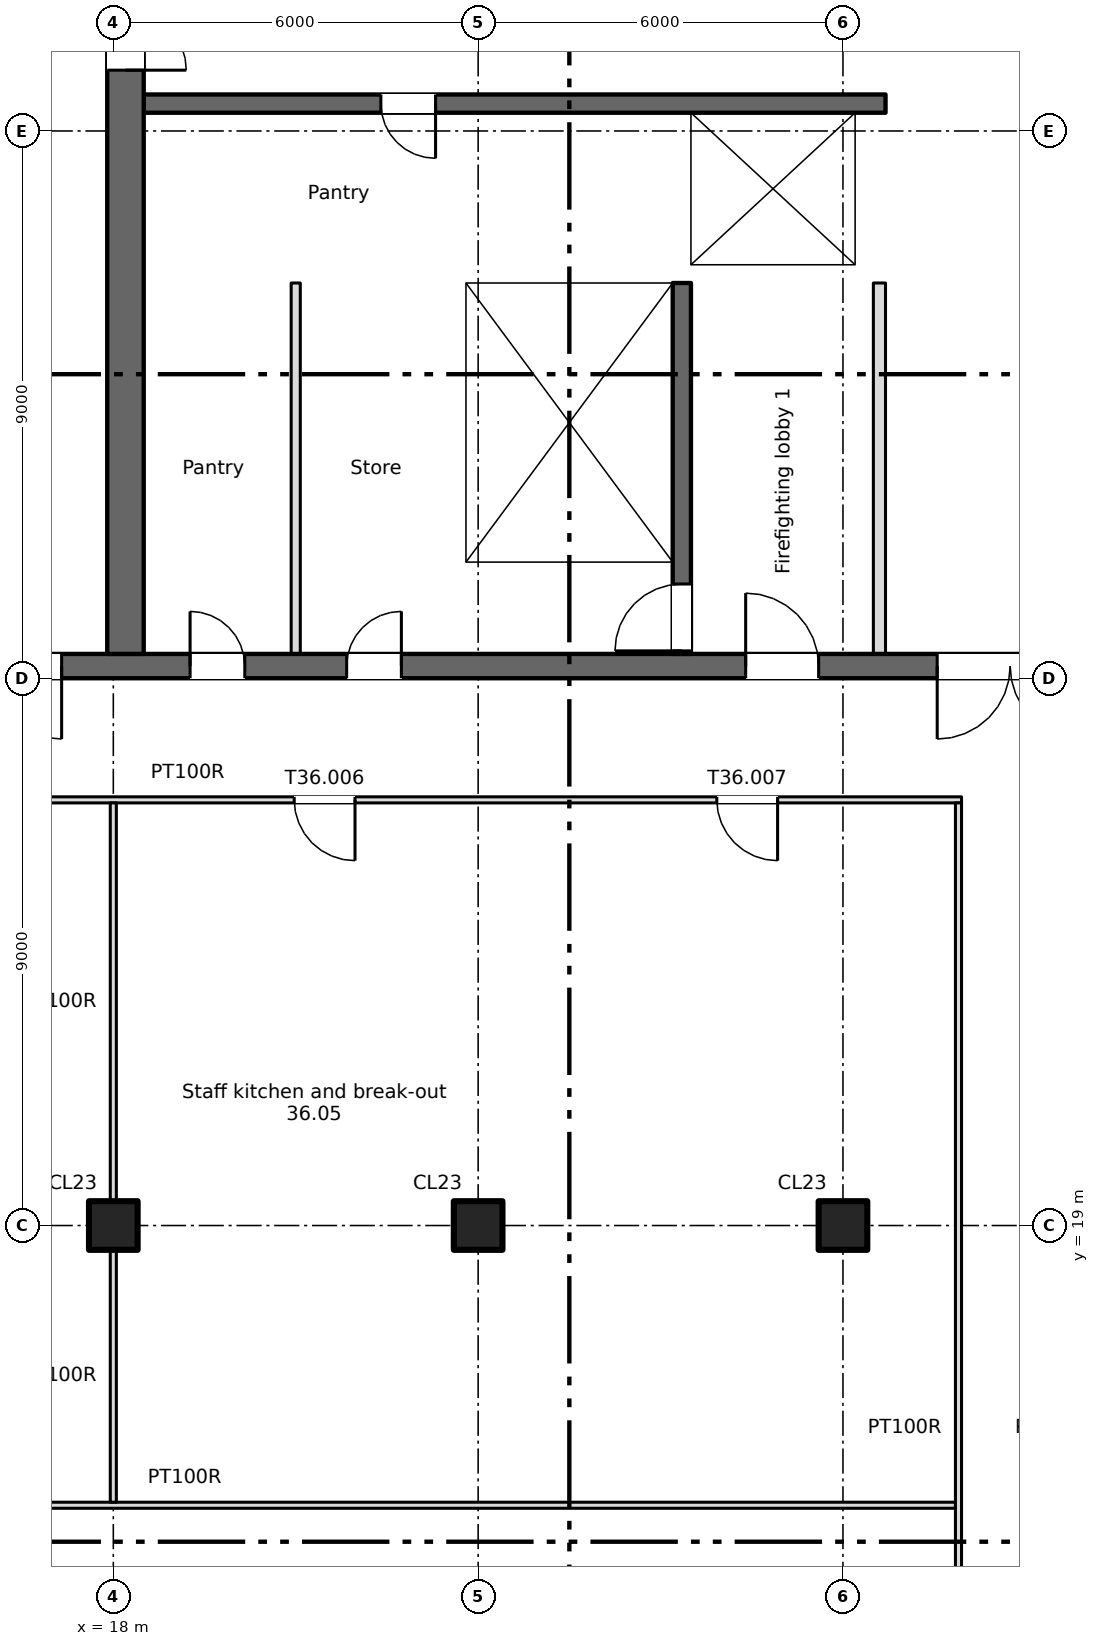
"""IFC4 building model, lengths in metres.
Left out: names, types, materials, properties, quantities, classifications, styles, units other than length and angle.
Written with IfcOpenShell. Run it as: python <this file> out.ifc"""

import sys

from ifc_helpers import new_model, si_unit, direction, frame, frame_2d, origin, origin_2d, place, context, subcontext, project, spatial, rectangle, extrude, element, fill, save


model = new_model("IFC4")
c1 = context("Model", 3, precision=1e-05, world=origin(), true_north=direction((0.0, 1.0)))
c2 = subcontext(c1, "Body", "Model", "MODEL_VIEW")
j1 = project(units=[si_unit("LENGTHUNIT", "METRE"), si_unit("PLANEANGLEUNIT", "RADIAN")], contexts=[c1])
p1 = place(None, origin())
s1 = spatial("IfcSite", under=j1, at=p1, CompositionType="ELEMENT")
p2 = place(p1, origin())
s2 = spatial("IfcBuilding", under=s1, at=p2, CompositionType="ELEMENT")
p3 = place(p2, frame((0.0, 0.0, 254.55)))
s3 = spatial("IfcBuildingStorey", under=s2, at=p3, CompositionType="ELEMENT", Elevation=254.55)
for number, where, z_axis, x_axis in (
    (1, (18.0, 19.0, 0.0), (0.0, 0.0, 1.0), (1.0, 0.0, 0.0)),
    (2, (24.0, 19.0, 0.0), (0.0, 0.0, 1.0), (1.0, 0.0, 0.0)),
    (3, (30.0, 19.0, 0.0), (0.0, 0.0, 1.0), (1.0, 0.0, 0.0)),
):
    element("IfcColumn", number, at=place(p3, frame(where, z_axis=z_axis, x_axis=x_axis)), inside=s3, PredefinedType="COLUMN", context=c2, shape_type="SweptSolid", body=[
        extrude(rectangle(XDim=0.8, YDim=0.8, at=origin_2d()), origin(), (0.0, 0.0, 1.0), 3.4),
    ])
p4 = place(p3, frame((6.5, 28.2, 0.0), z_axis=(0.0, 0.0, 1.0), x_axis=(1.0, 0.0, 0.0)))
e4 = element("IfcWall", 4, at=p4, inside=s3, PredefinedType="SHEAR", context=c2, shape_type="SweptSolid", body=[
    extrude(rectangle(XDim=58.0, YDim=0.4, at=frame_2d((29.0, 0.0))), origin(), (0.0, 0.0, 1.0), 3.4),
])
p5 = place(p4, frame((12.762, 0.0, 0.0)))
e5 = element("IfcOpeningElement", 5, at=p5, cuts=e4, PredefinedType="OPENING", context=c2, shape_type="SweptSolid", body=[
    extrude(rectangle(XDim=0.9, YDim=2.1, at=frame_2d((0.45, 1.05))), frame((0.0, 0.21, 0.0), z_axis=(0.0, -1.0, 0.0), x_axis=(1.0, 0.0, 0.0)), (0.0, 0.0, 1.0), 0.42),
])
p6 = place(p4, frame((15.337, 0.0, 0.0)))
e6 = element("IfcOpeningElement", 6, at=p6, cuts=e4, PredefinedType="OPENING", context=c2, shape_type="SweptSolid", body=[
    extrude(rectangle(XDim=0.9, YDim=2.1, at=frame_2d((0.45, 1.05))), frame((0.0, 0.21, 0.0), z_axis=(0.0, -1.0, 0.0), x_axis=(1.0, 0.0, 0.0)), (0.0, 0.0, 1.0), 0.42),
])
p7 = place(p4, frame((50.05, 0.0, 0.0)))
e7 = element("IfcOpeningElement", 7, at=p7, cuts=e4, PredefinedType="OPENING", context=c2, shape_type="SweptSolid", body=[
    extrude(rectangle(XDim=0.9, YDim=2.1, at=frame_2d((0.45, 1.05))), frame((0.0, 0.21, 0.0), z_axis=(0.0, -1.0, 0.0), x_axis=(1.0, 0.0, 0.0)), (0.0, 0.0, 1.0), 0.42),
])
p8 = place(p4, frame((0.762, 0.0, 0.0)))
e8 = element("IfcOpeningElement", 8, at=p8, cuts=e4, PredefinedType="OPENING", context=c2, shape_type="SweptSolid", body=[
    extrude(rectangle(XDim=0.9, YDim=2.1, at=frame_2d((0.45, 1.05))), frame((0.0, 0.21, 0.0), z_axis=(0.0, -1.0, 0.0), x_axis=(1.0, 0.0, 0.0)), (0.0, 0.0, 1.0), 0.42),
])
p9 = place(p4, frame((2.337, 0.0, 0.0)))
e9 = element("IfcOpeningElement", 9, at=p9, cuts=e4, PredefinedType="OPENING", context=c2, shape_type="SweptSolid", body=[
    extrude(rectangle(XDim=0.9, YDim=2.1, at=frame_2d((0.45, 1.05))), frame((0.0, 0.21, 0.0), z_axis=(0.0, -1.0, 0.0), x_axis=(1.0, 0.0, 0.0)), (0.0, 0.0, 1.0), 0.42),
])
p10 = place(p4, frame((4.9, 0.0, 0.0)))
e10 = element("IfcOpeningElement", 10, at=p10, cuts=e4, PredefinedType="OPENING", context=c2, shape_type="SweptSolid", body=[
    extrude(rectangle(XDim=1.2, YDim=2.1, at=frame_2d((0.6, 1.05))), frame((0.0, 0.21, 0.0), z_axis=(0.0, -1.0, 0.0), x_axis=(1.0, 0.0, 0.0)), (0.0, 0.0, 1.0), 0.42),
])
p11 = place(p4, frame((31.9, 0.0, 0.0)))
e11 = element("IfcOpeningElement", 11, at=p11, cuts=e4, PredefinedType="OPENING", context=c2, shape_type="SweptSolid", body=[
    extrude(rectangle(XDim=1.2, YDim=2.1, at=frame_2d((0.6, 1.05))), frame((0.0, 0.21, 0.0), z_axis=(0.0, -1.0, 0.0), x_axis=(1.0, 0.0, 0.0)), (0.0, 0.0, 1.0), 0.42),
])
p12 = place(p4, frame((55.4, 0.0, 0.0)))
e12 = element("IfcOpeningElement", 12, at=p12, cuts=e4, PredefinedType="OPENING", context=c2, shape_type="SweptSolid", body=[
    extrude(rectangle(XDim=1.2, YDim=2.1, at=frame_2d((0.6, 1.05))), frame((0.0, 0.21, 0.0), z_axis=(0.0, -1.0, 0.0), x_axis=(1.0, 0.0, 0.0)), (0.0, 0.0, 1.0), 0.42),
])
p13 = place(p4, frame((21.9, 0.0, 0.0)))
e13 = element("IfcOpeningElement", 13, at=p13, cuts=e4, PredefinedType="OPENING", context=c2, shape_type="SweptSolid", body=[
    extrude(rectangle(XDim=1.2, YDim=2.1, at=frame_2d((0.6, 1.05))), frame((0.0, 0.21, 0.0), z_axis=(0.0, -1.0, 0.0), x_axis=(1.0, 0.0, 0.0)), (0.0, 0.0, 1.0), 0.42),
])
p14 = place(p4, frame((41.9, 0.0, 0.0)))
e14 = element("IfcOpeningElement", 14, at=p14, cuts=e4, PredefinedType="OPENING", context=c2, shape_type="SweptSolid", body=[
    extrude(rectangle(XDim=1.2, YDim=2.1, at=frame_2d((0.6, 1.05))), frame((0.0, 0.21, 0.0), z_axis=(0.0, -1.0, 0.0), x_axis=(1.0, 0.0, 0.0)), (0.0, 0.0, 1.0), 0.42),
])
p15 = place(p4, frame((25.05, 0.0, 0.0)))
e15 = element("IfcOpeningElement", 15, at=p15, cuts=e4, PredefinedType="OPENING", context=c2, shape_type="SweptSolid", body=[
    extrude(rectangle(XDim=2.4, YDim=2.1, at=frame_2d((1.2, 1.05))), frame((0.0, 0.21, 0.0), z_axis=(0.0, -1.0, 0.0), x_axis=(1.0, 0.0, 0.0)), (0.0, 0.0, 1.0), 0.42),
])
p16 = place(p4, frame((37.55, 0.0, 0.0)))
e16 = element("IfcOpeningElement", 16, at=p16, cuts=e4, PredefinedType="OPENING", context=c2, shape_type="SweptSolid", body=[
    extrude(rectangle(XDim=2.4, YDim=2.1, at=frame_2d((1.2, 1.05))), frame((0.0, 0.21, 0.0), z_axis=(0.0, -1.0, 0.0), x_axis=(1.0, 0.0, 0.0)), (0.0, 0.0, 1.0), 0.42),
])
p17 = place(p4, frame((8.25, 0.0, 0.0)))
e17 = element("IfcOpeningElement", 17, at=p17, cuts=e4, PredefinedType="OPENING", context=c2, shape_type="SweptSolid", body=[
    extrude(rectangle(XDim=2.4, YDim=2.1, at=frame_2d((1.2, 1.05))), frame((0.0, 0.21, 0.0), z_axis=(0.0, -1.0, 0.0), x_axis=(1.0, 0.0, 0.0)), (0.0, 0.0, 1.0), 0.42),
])
p18 = place(p4, frame((29.05, 0.0, 0.0)))
e18 = element("IfcOpeningElement", 18, at=p18, cuts=e4, PredefinedType="OPENING", context=c2, shape_type="SweptSolid", body=[
    extrude(rectangle(XDim=0.9, YDim=2.1, at=frame_2d((0.45, 1.05))), frame((0.0, 0.21, 0.0), z_axis=(0.0, -1.0, 0.0), x_axis=(1.0, 0.0, 0.0)), (0.0, 0.0, 1.0), 0.42),
])
p19 = place(p4, frame((35.05, 0.0, 0.0)))
e19 = element("IfcOpeningElement", 19, at=p19, cuts=e4, PredefinedType="OPENING", context=c2, shape_type="SweptSolid", body=[
    extrude(rectangle(XDim=0.9, YDim=2.1, at=frame_2d((0.45, 1.05))), frame((0.0, 0.21, 0.0), z_axis=(0.0, -1.0, 0.0), x_axis=(1.0, 0.0, 0.0)), (0.0, 0.0, 1.0), 0.42),
])
p20 = place(p3, frame((18.2, 28.4, 0.0), z_axis=(0.0, 0.0, 1.0), x_axis=(0.0, 1.0, 0.0)))
e20 = element("IfcWall", 20, at=p20, inside=s3, PredefinedType="SHEAR", context=c2, shape_type="SweptSolid", body=[
    extrude(rectangle(XDim=17.0, YDim=0.6, at=frame_2d((8.5, 0.0))), origin(), (0.0, 0.0, 1.0), 3.4),
])
p21 = place(p20, frame((9.6, 0.0, 0.0)))
e21 = element("IfcOpeningElement", 21, at=p21, cuts=e20, PredefinedType="OPENING", context=c2, shape_type="SweptSolid", body=[
    extrude(rectangle(XDim=2.0, YDim=2.1, at=frame_2d((1.0, 1.05))), frame((0.0, 0.31, 0.0), z_axis=(0.0, -1.0, 0.0), x_axis=(1.0, 0.0, 0.0)), (0.0, 0.0, 1.0), 0.62),
])
p22 = place(p20, frame((15.45, 0.0, 0.0)))
e22 = element("IfcOpeningElement", 22, at=p22, cuts=e20, PredefinedType="OPENING", context=c2, shape_type="SweptSolid", body=[
    extrude(rectangle(XDim=1.2, YDim=2.1, at=frame_2d((0.6, 1.05))), frame((0.0, 0.31, 0.0), z_axis=(0.0, -1.0, 0.0), x_axis=(1.0, 0.0, 0.0)), (0.0, 0.0, 1.0), 0.62),
])
p23 = place(p3, frame((23.65, 28.4, 0.0), z_axis=(0.0, 0.0, 1.0), x_axis=(0.0, 1.0, 0.0)))
e23 = element("IfcWall", 23, at=p23, inside=s3, PredefinedType="SHEAR", context=c2, shape_type="SweptSolid", body=[
    extrude(rectangle(XDim=6.1, YDim=0.3, at=frame_2d((3.05, 0.0))), origin(), (0.0, 0.0, 1.0), 3.4),
])
p24 = place(p3, frame((27.35, 28.4, 0.0), z_axis=(0.0, 0.0, 1.0), x_axis=(0.0, 1.0, 0.0)))
e24 = element("IfcWall", 24, at=p24, inside=s3, PredefinedType="SHEAR", context=c2, shape_type="SweptSolid", body=[
    extrude(rectangle(XDim=6.1, YDim=0.3, at=frame_2d((3.05, 0.0))), origin(), (0.0, 0.0, 1.0), 3.4),
])
p25 = place(p24, frame((0.05, 0.0, 0.0)))
e25 = element("IfcOpeningElement", 25, at=p25, cuts=e24, PredefinedType="OPENING", context=c2, shape_type="SweptSolid", body=[
    extrude(rectangle(XDim=1.1, YDim=2.1, at=frame_2d((0.55, 1.05))), frame((0.0, 0.16, 0.0), z_axis=(0.0, -1.0, 0.0), x_axis=(1.0, 0.0, 0.0)), (0.0, 0.0, 1.0), 0.32),
])
p26 = place(p3, frame((18.5, 34.65, 0.0), z_axis=(0.0, 0.0, 1.0), x_axis=(1.0, 0.0, 0.0)))
e26 = element("IfcWall", 26, at=p26, inside=s3, PredefinedType="SHEAR", context=c2, shape_type="SweptSolid", body=[
    extrude(rectangle(XDim=12.2, YDim=0.3, at=frame_2d((6.1, 0.0))), origin(), (0.0, 0.0, 1.0), 3.4),
])
p27 = place(p26, frame((9.8, 0.0, 0.0)))
e27 = element("IfcOpeningElement", 27, at=p27, cuts=e26, PredefinedType="OPENING", context=c2, shape_type="SweptSolid", body=[
    extrude(rectangle(XDim=1.1, YDim=2.1, at=frame_2d((0.55, 1.05))), frame((0.0, 0.16, 0.0), z_axis=(0.0, -1.0, 0.0), x_axis=(1.0, 0.0, 0.0)), (0.0, 0.0, 1.0), 0.32),
])
p28 = place(p3, frame((30.7, 37.45, 0.0), z_axis=(0.0, 0.0, 1.0), x_axis=(-1.0, 0.0, 0.0)))
e28 = element("IfcWall", 28, at=p28, inside=s3, PredefinedType="SHEAR", context=c2, shape_type="SweptSolid", body=[
    extrude(rectangle(XDim=12.2, YDim=0.3, at=frame_2d((6.1, 0.0))), origin(), (0.0, 0.0, 1.0), 3.4),
])
p29 = place(p28, frame((7.4, 0.0, 0.0)))
e29 = element("IfcOpeningElement", 29, at=p29, cuts=e28, PredefinedType="OPENING", context=c2, shape_type="SweptSolid", body=[
    extrude(rectangle(XDim=0.9, YDim=2.1, at=frame_2d((0.45, 1.05))), frame((0.0, 0.16, 0.0), z_axis=(0.0, -1.0, 0.0), x_axis=(1.0, 0.0, 0.0)), (0.0, 0.0, 1.0), 0.32),
])
p30 = place(p3, frame((27.35, 34.8, 0.0), z_axis=(0.0, 0.0, 1.0), x_axis=(0.0, 1.0, 0.0)))
e30 = element("IfcWall", 30, at=p30, inside=s3, PredefinedType="SHEAR", context=c2, shape_type="SweptSolid", body=[
    extrude(rectangle(XDim=2.5, YDim=0.3, at=frame_2d((1.25, 0.0))), origin(), (0.0, 0.0, 1.0), 3.4),
])
p31 = place(p3, frame((30.45, 34.8, 0.0), z_axis=(0.0, 0.0, 1.0), x_axis=(0.0, 1.0, 0.0)))
e31 = element("IfcWall", 31, at=p31, inside=s3, PredefinedType="SHEAR", context=c2, shape_type="SweptSolid", body=[
    extrude(rectangle(XDim=2.5, YDim=0.5, at=frame_2d((1.25, 0.0))), origin(), (0.0, 0.0, 1.0), 3.4),
])
p32 = place(p3, frame((30.6, 28.4, 0.0), z_axis=(0.0, 0.0, 1.0), x_axis=(0.0, 1.0, 0.0)))
e32 = element("IfcWall", 32, at=p32, inside=s3, PredefinedType="PARTITIONING", context=c2, shape_type="SweptSolid", body=[
    extrude(rectangle(XDim=6.1, YDim=0.2, at=frame_2d((3.05, 0.0))), origin(), (0.0, 0.0, 1.0), 3.4),
])
p33 = place(p3, frame((21.0, 28.4, 0.0), z_axis=(0.0, 0.0, 1.0), x_axis=(0.0, 1.0, 0.0)))
e33 = element("IfcWall", 33, at=p33, inside=s3, PredefinedType="PARTITIONING", context=c2, shape_type="SweptSolid", body=[
    extrude(rectangle(XDim=6.1, YDim=0.15, at=frame_2d((3.05, 0.0))), origin(), (0.0, 0.0, 1.0), 3.4),
])
p34 = place(p3, frame((6.5, 14.4, 0.0), z_axis=(0.0, 0.0, 1.0), x_axis=(1.0, 0.0, 0.0)))
e34 = element("IfcWall", 34, at=p34, inside=s3, PredefinedType="PARTITIONING", context=c2, shape_type="SweptSolid", body=[
    extrude(rectangle(XDim=25.35, YDim=0.1, at=frame_2d((12.675, 0.0))), origin(), (0.0, 0.0, 1.0), 3.4),
])
p35 = place(p3, frame((6.5, 26.0, 0.0), z_axis=(0.0, 0.0, 1.0), x_axis=(1.0, 0.0, 0.0)))
e35 = element("IfcWall", 35, at=p35, inside=s3, PredefinedType="PARTITIONING", context=c2, shape_type="SweptSolid", body=[
    extrude(rectangle(XDim=25.45, YDim=0.1, at=frame_2d((12.725, 0.0))), origin(), (0.0, 0.0, 1.0), 3.4),
])
p36 = place(p35, frame((4.85, 0.0, 0.0)))
e36 = element("IfcOpeningElement", 36, at=p36, cuts=e35, PredefinedType="OPENING", context=c2, shape_type="SweptSolid", body=[
    extrude(rectangle(XDim=1.8, YDim=2.1, at=frame_2d((0.9, 1.05))), frame((0.0, 0.06, 0.0), z_axis=(0.0, -1.0, 0.0), x_axis=(1.0, 0.0, 0.0)), (0.0, 0.0, 1.0), 0.12),
])
p37 = place(p35, frame((14.475, 0.0, 0.0)))
e37 = element("IfcOpeningElement", 37, at=p37, cuts=e35, PredefinedType="OPENING", context=c2, shape_type="SweptSolid", body=[
    extrude(rectangle(XDim=1.0, YDim=2.1, at=frame_2d((0.5, 1.05))), frame((0.0, 0.06, 0.0), z_axis=(0.0, -1.0, 0.0), x_axis=(1.0, 0.0, 0.0)), (0.0, 0.0, 1.0), 0.12),
])
p38 = place(p35, frame((21.425, 0.0, 0.0)))
e38 = element("IfcOpeningElement", 38, at=p38, cuts=e35, PredefinedType="OPENING", context=c2, shape_type="SweptSolid", body=[
    extrude(rectangle(XDim=1.0, YDim=2.1, at=frame_2d((0.5, 1.05))), frame((0.0, 0.06, 0.0), z_axis=(0.0, -1.0, 0.0), x_axis=(1.0, 0.0, 0.0)), (0.0, 0.0, 1.0), 0.12),
])
p39 = place(p3, frame((18.0, 14.45, 0.0), z_axis=(0.0, 0.0, 1.0), x_axis=(0.0, 1.0, 0.0)))
e39 = element("IfcWall", 39, at=p39, inside=s3, PredefinedType="PARTITIONING", context=c2, shape_type="SweptSolid", body=[
    extrude(rectangle(XDim=4.15, YDim=0.1, at=frame_2d((2.075, 0.0))), origin(), (0.0, 0.0, 1.0), 3.4),
])
p40 = place(p3, frame((18.0, 19.4, 0.0), z_axis=(0.0, 0.0, 1.0), x_axis=(0.0, 1.0, 0.0)))
e40 = element("IfcWall", 40, at=p40, inside=s3, PredefinedType="PARTITIONING", context=c2, shape_type="SweptSolid", body=[
    extrude(rectangle(XDim=6.55, YDim=0.1, at=frame_2d((3.275, 0.0))), origin(), (0.0, 0.0, 1.0), 3.4),
])
p41 = place(p3, frame((31.9, 5.4, 0.0), z_axis=(0.0, 0.0, 1.0), x_axis=(0.0, 1.0, 0.0)))
e41 = element("IfcWall", 41, at=p41, inside=s3, PredefinedType="PARTITIONING", context=c2, shape_type="SweptSolid", body=[
    extrude(rectangle(XDim=20.55, YDim=0.1, at=frame_2d((10.275, 0.0))), origin(), (0.0, 0.0, 1.0), 3.4),
])
p42 = place(p41, frame((1.65, 0.0, 0.0)))
e42 = element("IfcOpeningElement", 42, at=p42, cuts=e41, PredefinedType="OPENING", context=c2, shape_type="SweptSolid", body=[
    extrude(rectangle(XDim=1.2, YDim=2.1, at=frame_2d((0.6, 1.05))), frame((0.0, 0.06, 0.0), z_axis=(0.0, -1.0, 0.0), x_axis=(1.0, 0.0, 0.0)), (0.0, 0.0, 1.0), 0.12),
])
p43 = place(p41, frame((6.15, 0.0, 0.0)))
e43 = element("IfcOpeningElement", 43, at=p43, cuts=e41, PredefinedType="OPENING", context=c2, shape_type="SweptSolid", body=[
    extrude(rectangle(XDim=1.2, YDim=2.1, at=frame_2d((0.6, 1.05))), frame((0.0, 0.06, 0.0), z_axis=(0.0, -1.0, 0.0), x_axis=(1.0, 0.0, 0.0)), (0.0, 0.0, 1.0), 0.12),
])
p44 = place(p5, origin())
e44 = element("IfcDoor", 44, at=p44, inside=s3, OperationType="SINGLE_SWING_LEFT", PredefinedType="DOOR", context=c2, shape_type="SweptSolid", body=[
    extrude(rectangle(XDim=0.9, YDim=2.1, at=frame_2d((0.45, 1.05))), frame((0.0, 0.025, 0.0), z_axis=(0.0, -1.0, 0.0), x_axis=(1.0, 0.0, 0.0)), (0.0, 0.0, 1.0), 0.05),
])
fill(e5, e44)
p45 = place(p6, origin())
e45 = element("IfcDoor", 45, at=p45, inside=s3, OperationType="SINGLE_SWING_RIGHT", PredefinedType="DOOR", context=c2, shape_type="SweptSolid", body=[
    extrude(rectangle(XDim=0.9, YDim=2.1, at=frame_2d((0.45, 1.05))), frame((0.0, 0.025, 0.0), z_axis=(0.0, -1.0, 0.0), x_axis=(1.0, 0.0, 0.0)), (0.0, 0.0, 1.0), 0.05),
])
fill(e6, e45)
p46 = place(p29, origin())
e46 = element("IfcDoor", 46, at=p46, inside=s3, OperationType="SINGLE_SWING_LEFT", PredefinedType="DOOR", context=c2, shape_type="SweptSolid", body=[
    extrude(rectangle(XDim=0.9, YDim=2.1, at=frame_2d((0.45, 1.05))), frame((0.0, 0.025, 0.0), z_axis=(0.0, -1.0, 0.0), x_axis=(1.0, 0.0, 0.0)), (0.0, 0.0, 1.0), 0.05),
])
fill(e29, e46)
p47 = place(p27, origin())
e47 = element("IfcDoor", 47, at=p47, inside=s3, OperationType="SLIDING_TO_LEFT", PredefinedType="DOOR", context=c2, shape_type="SweptSolid", body=[
    extrude(rectangle(XDim=1.1, YDim=2.1, at=frame_2d((0.55, 1.05))), frame((0.0, 0.025, 0.0), z_axis=(0.0, -1.0, 0.0), x_axis=(1.0, 0.0, 0.0)), (0.0, 0.0, 1.0), 0.05),
])
fill(e27, e47)
p48 = place(p25, origin())
e48 = element("IfcDoor", 48, at=p48, inside=s3, OperationType="SINGLE_SWING_LEFT", PredefinedType="DOOR", context=c2, shape_type="SweptSolid", body=[
    extrude(rectangle(XDim=1.1, YDim=2.1, at=frame_2d((0.55, 1.05))), frame((0.0, 0.025, 0.0), z_axis=(0.0, -1.0, 0.0), x_axis=(1.0, 0.0, 0.0)), (0.0, 0.0, 1.0), 0.05),
])
fill(e25, e48)
p49 = place(p13, origin())
e49 = element("IfcDoor", 49, at=p49, inside=s3, OperationType="SINGLE_SWING_LEFT", PredefinedType="DOOR", context=c2, shape_type="SweptSolid", body=[
    extrude(rectangle(XDim=1.2, YDim=2.1, at=frame_2d((0.6, 1.05))), frame((0.0, 0.025, 0.0), z_axis=(0.0, -1.0, 0.0), x_axis=(1.0, 0.0, 0.0)), (0.0, 0.0, 1.0), 0.05),
])
fill(e13, e49)
p50 = place(p15, origin())
e50 = element("IfcDoor", 50, at=p50, inside=s3, OperationType="DOUBLE_DOOR_SINGLE_SWING", PredefinedType="DOOR", context=c2, shape_type="SweptSolid", body=[
    extrude(rectangle(XDim=2.4, YDim=2.1, at=frame_2d((1.2, 1.05))), frame((0.0, 0.025, 0.0), z_axis=(0.0, -1.0, 0.0), x_axis=(1.0, 0.0, 0.0)), (0.0, 0.0, 1.0), 0.05),
])
fill(e15, e50)
p51 = place(p17, origin())
e51 = element("IfcDoor", 51, at=p51, inside=s3, OperationType="DOUBLE_DOOR_SINGLE_SWING", PredefinedType="DOOR", context=c2, shape_type="SweptSolid", body=[
    extrude(rectangle(XDim=2.4, YDim=2.1, at=frame_2d((1.2, 1.05))), frame((0.0, 0.025, 0.0), z_axis=(0.0, -1.0, 0.0), x_axis=(1.0, 0.0, 0.0)), (0.0, 0.0, 1.0), 0.05),
])
fill(e17, e51)
p52 = place(p21, origin())
e52 = element("IfcDoor", 52, at=p52, inside=s3, OperationType="DOUBLE_DOOR_SINGLE_SWING", PredefinedType="DOOR", context=c2, shape_type="SweptSolid", body=[
    extrude(rectangle(XDim=2.0, YDim=2.1, at=frame_2d((1.0, 1.05))), frame((0.0, 0.025, 0.0), z_axis=(0.0, -1.0, 0.0), x_axis=(1.0, 0.0, 0.0)), (0.0, 0.0, 1.0), 0.05),
])
fill(e21, e52)
p53 = place(p37, origin())
e53 = element("IfcDoor", 53, at=p53, inside=s3, OperationType="SINGLE_SWING_RIGHT", PredefinedType="DOOR", context=c2, shape_type="SweptSolid", body=[
    extrude(rectangle(XDim=1.0, YDim=2.1, at=frame_2d((0.5, 1.05))), frame((0.0, 0.025, 0.0), z_axis=(0.0, -1.0, 0.0), x_axis=(1.0, 0.0, 0.0)), (0.0, 0.0, 1.0), 0.05),
])
fill(e37, e53)
p54 = place(p38, origin())
e54 = element("IfcDoor", 54, at=p54, inside=s3, OperationType="SINGLE_SWING_RIGHT", PredefinedType="DOOR", context=c2, shape_type="SweptSolid", body=[
    extrude(rectangle(XDim=1.0, YDim=2.1, at=frame_2d((0.5, 1.05))), frame((0.0, 0.025, 0.0), z_axis=(0.0, -1.0, 0.0), x_axis=(1.0, 0.0, 0.0)), (0.0, 0.0, 1.0), 0.05),
])
fill(e38, e54)
save(model, sys.argv[1])
